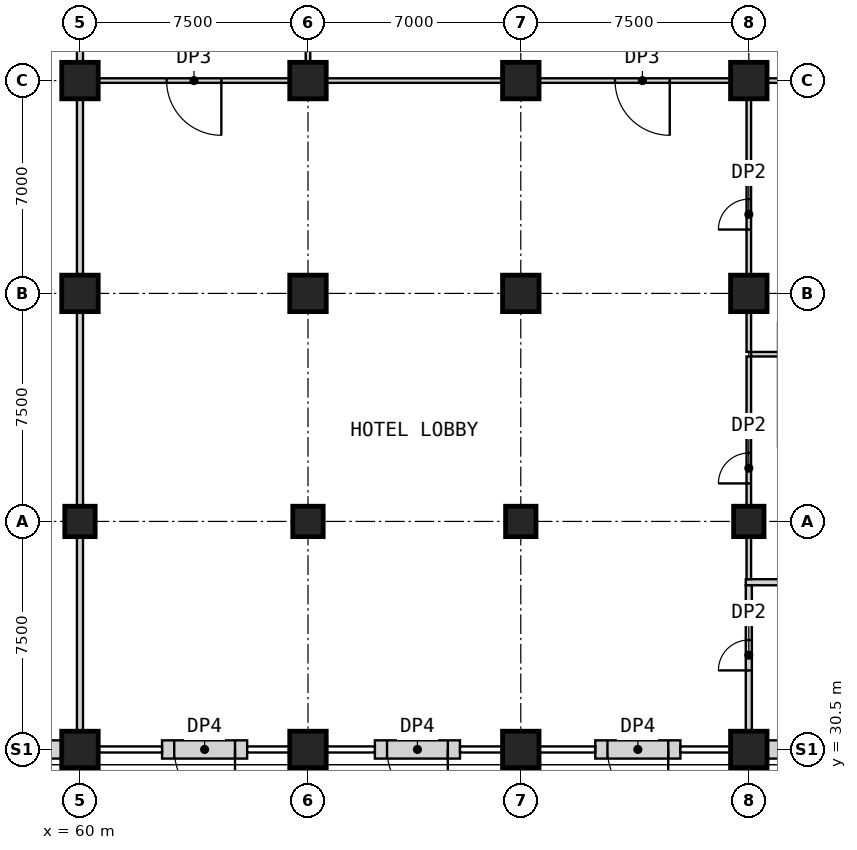
"""IFC4 building model, lengths in metres.
Left out: names, types, materials, properties, quantities, classifications, styles, units other than length and angle.
Written with IfcOpenShell. Run it as: python <this file> out.ifc"""

import sys

from ifc_helpers import new_model, si_unit, direction, frame, frame_2d, origin, origin_2d, place, context, subcontext, project, spatial, rectangle, extrude, element, fill, save


model = new_model("IFC4")
c1 = context("Model", 3, precision=1e-05, world=origin(), true_north=direction((0.0, 1.0)))
c2 = subcontext(c1, "Body", "Model", "MODEL_VIEW")
j1 = project(units=[si_unit("LENGTHUNIT", "METRE"), si_unit("PLANEANGLEUNIT", "RADIAN")], contexts=[c1])
p1 = place(None, origin())
s1 = spatial("IfcSite", under=j1, at=p1, CompositionType="ELEMENT")
p2 = place(p1, origin())
s2 = spatial("IfcBuilding", under=s1, at=p2, CompositionType="ELEMENT")
p3 = place(p2, origin())
s3 = spatial("IfcBuildingStorey", under=s2, at=p3, CompositionType="ELEMENT", Elevation=0.0)
p4 = place(p3, frame((60.0, 38.0, 0.0), z_axis=(0.0, 0.0, 1.0), x_axis=(1.0, 0.0, 0.0)))
e1 = element("IfcColumn", 1, at=p4, inside=s3, PredefinedType="COLUMN", context=c2, shape_type="SweptSolid", body=[
    extrude(rectangle(XDim=1.0, YDim=1.0, at=origin_2d()), origin(), (0.0, 0.0, 1.0), 8.0),
])
for number, where, z_axis, x_axis in (
    (2, (60.0, 45.5, 0.0), (0.0, 0.0, 1.0), (1.0, 0.0, 0.0)),
    (3, (60.0, 52.5, 0.0), (0.0, 0.0, 1.0), (1.0, 0.0, 0.0)),
):
    element("IfcColumn", number, at=place(p3, frame(where, z_axis=z_axis, x_axis=x_axis)), inside=s3, PredefinedType="COLUMN", context=c2, shape_type="SweptSolid", body=[
        extrude(rectangle(XDim=1.2, YDim=1.2, at=origin_2d()), origin(), (0.0, 0.0, 1.0), 8.0),
    ])
p5 = place(p3, frame((67.5, 38.0, 0.0), z_axis=(0.0, 0.0, 1.0), x_axis=(1.0, 0.0, 0.0)))
e4 = element("IfcColumn", 4, at=p5, inside=s3, PredefinedType="COLUMN", context=c2, shape_type="SweptSolid", body=[
    extrude(rectangle(XDim=1.0, YDim=1.0, at=origin_2d()), origin(), (0.0, 0.0, 1.0), 8.0),
])
for number, where, z_axis, x_axis in (
    (5, (67.5, 45.5, 0.0), (0.0, 0.0, 1.0), (1.0, 0.0, 0.0)),
    (6, (67.5, 52.5, 0.0), (0.0, 0.0, 1.0), (1.0, 0.0, 0.0)),
):
    element("IfcColumn", number, at=place(p3, frame(where, z_axis=z_axis, x_axis=x_axis)), inside=s3, PredefinedType="COLUMN", context=c2, shape_type="SweptSolid", body=[
        extrude(rectangle(XDim=1.2, YDim=1.2, at=origin_2d()), origin(), (0.0, 0.0, 1.0), 8.0),
    ])
p6 = place(p3, frame((74.5, 38.0, 0.0), z_axis=(0.0, 0.0, 1.0), x_axis=(1.0, 0.0, 0.0)))
e7 = element("IfcColumn", 7, at=p6, inside=s3, PredefinedType="COLUMN", context=c2, shape_type="SweptSolid", body=[
    extrude(rectangle(XDim=1.0, YDim=1.0, at=origin_2d()), origin(), (0.0, 0.0, 1.0), 8.0),
])
for number, where, z_axis, x_axis in (
    (8, (74.5, 45.5, 0.0), (0.0, 0.0, 1.0), (1.0, 0.0, 0.0)),
    (9, (74.5, 52.5, 0.0), (0.0, 0.0, 1.0), (1.0, 0.0, 0.0)),
):
    element("IfcColumn", number, at=place(p3, frame(where, z_axis=z_axis, x_axis=x_axis)), inside=s3, PredefinedType="COLUMN", context=c2, shape_type="SweptSolid", body=[
        extrude(rectangle(XDim=1.2, YDim=1.2, at=origin_2d()), origin(), (0.0, 0.0, 1.0), 8.0),
    ])
p7 = place(p3, frame((82.0, 38.0, 0.0), z_axis=(0.0, 0.0, 1.0), x_axis=(1.0, 0.0, 0.0)))
e10 = element("IfcColumn", 10, at=p7, inside=s3, PredefinedType="COLUMN", context=c2, shape_type="SweptSolid", body=[
    extrude(rectangle(XDim=1.0, YDim=1.0, at=origin_2d()), origin(), (0.0, 0.0, 1.0), 8.0),
])
for number, where, z_axis, x_axis in (
    (11, (82.0, 45.5, 0.0), (0.0, 0.0, 1.0), (1.0, 0.0, 0.0)),
    (12, (82.0, 52.5, 0.0), (0.0, 0.0, 1.0), (1.0, 0.0, 0.0)),
    (13, (60.0, 30.5, 0.0), (0.0, 0.0, 1.0), (1.0, 0.0, 0.0)),
    (14, (67.5, 30.5, 0.0), (0.0, 0.0, 1.0), (1.0, 0.0, 0.0)),
    (15, (74.5, 30.5, 0.0), (0.0, 0.0, 1.0), (1.0, 0.0, 0.0)),
    (16, (82.0, 30.5, 0.0), (0.0, 0.0, 1.0), (1.0, 0.0, 0.0)),
):
    element("IfcColumn", number, at=place(p3, frame(where, z_axis=z_axis, x_axis=x_axis)), inside=s3, PredefinedType="COLUMN", context=c2, shape_type="SweptSolid", body=[
        extrude(rectangle(XDim=1.2, YDim=1.2, at=origin_2d()), origin(), (0.0, 0.0, 1.0), 8.0),
    ])
p8 = place(p3, frame((57.75, 30.5, 0.0), z_axis=(0.0, 0.0, 1.0), x_axis=(1.0, 0.0, 0.0)))
e17 = element("IfcWall", 17, at=p8, inside=s3, PredefinedType="PARTITIONING", context=c2, shape_type="SweptSolid", body=[
    extrude(rectangle(XDim=1.65, YDim=0.6, at=frame_2d((0.825, 0.0))), origin(), (0.0, 0.0, 1.0), 7.1),
])
p9 = place(p3, frame((65.5, 30.5, 0.0), z_axis=(0.0, 0.0, 1.0), x_axis=(-1.0, 0.0, 0.0)))
e18 = element("IfcWall", 18, at=p9, inside=s3, PredefinedType="PARTITIONING", context=c2, shape_type="SweptSolid", body=[
    extrude(rectangle(XDim=2.8, YDim=0.6, at=frame_2d((1.4, 0.0))), origin(), (0.0, 0.0, 1.0), 7.1),
])
p10 = place(p9, frame((0.4, 0.0, 0.0)))
e19 = element("IfcOpeningElement", 19, at=p10, cuts=e18, PredefinedType="OPENING", context=c2, shape_type="SweptSolid", body=[
    extrude(rectangle(XDim=2.0, YDim=2.4, at=frame_2d((1.0, 1.2))), frame((0.0, 0.31, 0.0), z_axis=(0.0, -1.0, 0.0), x_axis=(1.0, 0.0, 0.0)), (0.0, 0.0, 1.0), 0.62),
])
p11 = place(p3, frame((72.5, 30.5, 0.0), z_axis=(0.0, 0.0, 1.0), x_axis=(-1.0, 0.0, 0.0)))
e20 = element("IfcWall", 20, at=p11, inside=s3, PredefinedType="PARTITIONING", context=c2, shape_type="SweptSolid", body=[
    extrude(rectangle(XDim=2.8, YDim=0.6, at=frame_2d((1.4, 0.0))), origin(), (0.0, 0.0, 1.0), 7.1),
])
p12 = place(p11, frame((0.4, 0.0, 0.0)))
e21 = element("IfcOpeningElement", 21, at=p12, cuts=e20, PredefinedType="OPENING", context=c2, shape_type="SweptSolid", body=[
    extrude(rectangle(XDim=2.0, YDim=2.4, at=frame_2d((1.0, 1.2))), frame((0.0, 0.31, 0.0), z_axis=(0.0, -1.0, 0.0), x_axis=(1.0, 0.0, 0.0)), (0.0, 0.0, 1.0), 0.62),
])
p13 = place(p3, frame((79.75, 30.5, 0.0), z_axis=(0.0, 0.0, 1.0), x_axis=(-1.0, 0.0, 0.0)))
e22 = element("IfcWall", 22, at=p13, inside=s3, PredefinedType="PARTITIONING", context=c2, shape_type="SweptSolid", body=[
    extrude(rectangle(XDim=2.8, YDim=0.6, at=frame_2d((1.4, 0.0))), origin(), (0.0, 0.0, 1.0), 7.1),
])
p14 = place(p13, frame((0.4, 0.0, 0.0)))
e23 = element("IfcOpeningElement", 23, at=p14, cuts=e22, PredefinedType="OPENING", context=c2, shape_type="SweptSolid", body=[
    extrude(rectangle(XDim=2.0, YDim=2.4, at=frame_2d((1.0, 1.2))), frame((0.0, 0.31, 0.0), z_axis=(0.0, -1.0, 0.0), x_axis=(1.0, 0.0, 0.0)), (0.0, 0.0, 1.0), 0.62),
])
p15 = place(p3, frame((82.6, 30.5, 0.0), z_axis=(0.0, 0.0, 1.0), x_axis=(1.0, 0.0, 0.0)))
e24 = element("IfcWall", 24, at=p15, inside=s3, PredefinedType="PARTITIONING", context=c2, shape_type="SweptSolid", body=[
    extrude(rectangle(XDim=2.35, YDim=0.6, at=frame_2d((1.175, 0.0))), origin(), (0.0, 0.0, 1.0), 7.1),
])
p16 = place(p3, frame((66.9, 52.5, 0.0), z_axis=(0.0, 0.0, 1.0), x_axis=(-1.0, 0.0, 0.0)))
e25 = element("IfcWall", 25, at=p16, inside=s3, PredefinedType="PARTITIONING", context=c2, shape_type="SweptSolid", body=[
    extrude(rectangle(XDim=6.3, YDim=0.15, at=frame_2d((3.15, 0.0))), origin(), (0.0, 0.0, 1.0), 7.7),
])
p17 = place(p16, frame((2.25, 0.0, 0.0)))
e26 = element("IfcOpeningElement", 26, at=p17, cuts=e25, PredefinedType="OPENING", context=c2, shape_type="SweptSolid", body=[
    extrude(rectangle(XDim=1.8, YDim=2.4, at=frame_2d((0.9, 1.2))), frame((0.0, 0.085, 0.0), z_axis=(0.0, -1.0, 0.0), x_axis=(1.0, 0.0, 0.0)), (0.0, 0.0, 1.0), 0.17),
])
p18 = place(p3, frame((68.1, 52.5, 0.0), z_axis=(0.0, 0.0, 1.0), x_axis=(1.0, 0.0, 0.0)))
e27 = element("IfcWall", 27, at=p18, inside=s3, PredefinedType="PARTITIONING", context=c2, shape_type="SweptSolid", body=[
    extrude(rectangle(XDim=5.8, YDim=0.15, at=frame_2d((2.9, 0.0))), origin(), (0.0, 0.0, 1.0), 7.7),
])
p19 = place(p3, frame((81.4, 52.5, 0.0), z_axis=(0.0, 0.0, 1.0), x_axis=(-1.0, 0.0, 0.0)))
e28 = element("IfcWall", 28, at=p19, inside=s3, PredefinedType="PARTITIONING", context=c2, shape_type="SweptSolid", body=[
    extrude(rectangle(XDim=6.3, YDim=0.15, at=frame_2d((3.15, 0.0))), origin(), (0.0, 0.0, 1.0), 7.7),
])
p20 = place(p19, frame((2.0, 0.0, 0.0)))
e29 = element("IfcOpeningElement", 29, at=p20, cuts=e28, PredefinedType="OPENING", context=c2, shape_type="SweptSolid", body=[
    extrude(rectangle(XDim=1.8, YDim=2.4, at=frame_2d((0.9, 1.2))), frame((0.0, 0.085, 0.0), z_axis=(0.0, -1.0, 0.0), x_axis=(1.0, 0.0, 0.0)), (0.0, 0.0, 1.0), 0.17),
])
p21 = place(p3, frame((82.6, 52.5, 0.0), z_axis=(0.0, 0.0, 1.0), x_axis=(1.0, 0.0, 0.0)))
e30 = element("IfcWall", 30, at=p21, inside=s3, PredefinedType="PARTITIONING", context=c2, shape_type="SweptSolid", body=[
    extrude(rectangle(XDim=6.4, YDim=0.15, at=frame_2d((3.2, 0.0))), origin(), (0.0, 0.0, 1.0), 7.7),
])
p22 = place(p3, frame((81.9, 36.0, 0.0), z_axis=(0.0, 0.0, 1.0), x_axis=(1.0, 0.0, 0.0)))
e31 = element("IfcWall", 31, at=p22, inside=s3, PredefinedType="PARTITIONING", context=c2, shape_type="SweptSolid", body=[
    extrude(rectangle(XDim=7.7, YDim=0.2, at=frame_2d((3.85, 0.0))), origin(), (0.0, 0.0, 1.0), 7.7),
])
p23 = place(p3, frame((82.075, 43.5, 0.0), z_axis=(0.0, 0.0, 1.0), x_axis=(1.0, 0.0, 0.0)))
e32 = element("IfcWall", 32, at=p23, inside=s3, PredefinedType="PARTITIONING", context=c2, shape_type="SweptSolid", body=[
    extrude(rectangle(XDim=0.925, YDim=0.15, at=frame_2d((0.462, 0.0))), origin(), (0.0, 0.0, 1.0), 7.7),
])
for number, where, z_axis, x_axis in (
    (33, (60.0, 31.1, 0.0), (0.0, 0.0, 1.0), (0.0, 1.0, 0.0)),
    (34, (60.0, 38.5, 0.0), (0.0, 0.0, 1.0), (0.0, 1.0, 0.0)),
):
    element("IfcWall", number, at=place(p3, frame(where, z_axis=z_axis, x_axis=x_axis)), inside=s3, PredefinedType="PARTITIONING", context=c2, shape_type="SweptSolid", body=[
        extrude(rectangle(XDim=6.4, YDim=0.2, at=frame_2d((3.2, 0.0))), origin(), (0.0, 0.0, 1.0), 7.7),
    ])
p24 = place(p3, frame((60.0, 46.1, 0.0), z_axis=(0.0, 0.0, 1.0), x_axis=(0.0, 1.0, 0.0)))
e35 = element("IfcWall", 35, at=p24, inside=s3, PredefinedType="PARTITIONING", context=c2, shape_type="SweptSolid", body=[
    extrude(rectangle(XDim=5.8, YDim=0.2, at=frame_2d((2.9, 0.0))), origin(), (0.0, 0.0, 1.0), 7.7),
])
p25 = place(p3, frame((60.0, 53.1, 0.0), z_axis=(0.0, 0.0, 1.0), x_axis=(0.0, 1.0, 0.0)))
e36 = element("IfcWall", 36, at=p25, inside=s3, PredefinedType="PARTITIONING", context=c2, shape_type="SweptSolid", body=[
    extrude(rectangle(XDim=6.8, YDim=0.2, at=frame_2d((3.4, 0.0))), origin(), (0.0, 0.0, 1.0), 7.7),
])
p26 = place(p3, frame((67.5, 53.1, 0.0), z_axis=(0.0, 0.0, 1.0), x_axis=(0.0, 1.0, 0.0)))
e37 = element("IfcWall", 37, at=p26, inside=s3, PredefinedType="PARTITIONING", context=c2, shape_type="SweptSolid", body=[
    extrude(rectangle(XDim=6.3, YDim=0.15, at=frame_2d((3.15, 0.0))), origin(), (0.0, 0.0, 1.0), 7.7),
])
p27 = place(p3, frame((82.0, 31.1, 0.0), z_axis=(0.0, 0.0, 1.0), x_axis=(0.0, 1.0, 0.0)))
e38 = element("IfcWall", 38, at=p27, inside=s3, PredefinedType="PARTITIONING", context=c2, shape_type="SweptSolid", body=[
    extrude(rectangle(XDim=4.8, YDim=0.2, at=frame_2d((2.4, 0.0))), origin(), (0.0, 0.0, 1.0), 7.7),
])
p28 = place(p27, frame((2.0, 0.0, 0.0)))
e39 = element("IfcOpeningElement", 39, at=p28, cuts=e38, PredefinedType="OPENING", context=c2, shape_type="SweptSolid", body=[
    extrude(rectangle(XDim=1.0, YDim=2.1, at=frame_2d((0.5, 1.05))), frame((0.0, 0.11, 0.0), z_axis=(0.0, -1.0, 0.0), x_axis=(1.0, 0.0, 0.0)), (0.0, 0.0, 1.0), 0.22),
])
p29 = place(p3, frame((82.0, 36.1, 0.0), z_axis=(0.0, 0.0, 1.0), x_axis=(0.0, 1.0, 0.0)))
e40 = element("IfcWall", 40, at=p29, inside=s3, PredefinedType="PARTITIONING", context=c2, shape_type="SweptSolid", body=[
    extrude(rectangle(XDim=1.4, YDim=0.15, at=frame_2d((0.7, 0.0))), origin(), (0.0, 0.0, 1.0), 7.7),
])
p30 = place(p3, frame((82.0, 38.5, 0.0), z_axis=(0.0, 0.0, 1.0), x_axis=(0.0, 1.0, 0.0)))
e41 = element("IfcWall", 41, at=p30, inside=s3, PredefinedType="PARTITIONING", context=c2, shape_type="SweptSolid", body=[
    extrude(rectangle(XDim=4.925, YDim=0.15, at=frame_2d((2.462, 0.0))), origin(), (0.0, 0.0, 1.0), 7.7),
])
p31 = place(p30, frame((0.75, 0.0, 0.0)))
e42 = element("IfcOpeningElement", 42, at=p31, cuts=e41, PredefinedType="OPENING", context=c2, shape_type="SweptSolid", body=[
    extrude(rectangle(XDim=1.0, YDim=2.1, at=frame_2d((0.5, 1.05))), frame((0.0, 0.085, 0.0), z_axis=(0.0, -1.0, 0.0), x_axis=(1.0, 0.0, 0.0)), (0.0, 0.0, 1.0), 0.17),
])
p32 = place(p3, frame((82.0, 43.575, 0.0), z_axis=(0.0, 0.0, 1.0), x_axis=(0.0, 1.0, 0.0)))
e43 = element("IfcWall", 43, at=p32, inside=s3, PredefinedType="PARTITIONING", context=c2, shape_type="SweptSolid", body=[
    extrude(rectangle(XDim=1.325, YDim=0.15, at=frame_2d((0.663, 0.0))), origin(), (0.0, 0.0, 1.0), 7.7),
])
p33 = place(p3, frame((82.0, 46.1, 0.0), z_axis=(0.0, 0.0, 1.0), x_axis=(0.0, 1.0, 0.0)))
e44 = element("IfcWall", 44, at=p33, inside=s3, PredefinedType="PARTITIONING", context=c2, shape_type="SweptSolid", body=[
    extrude(rectangle(XDim=5.8, YDim=0.15, at=frame_2d((2.9, 0.0))), origin(), (0.0, 0.0, 1.0), 7.7),
])
p34 = place(p33, frame((1.5, 0.0, 0.0)))
e45 = element("IfcOpeningElement", 45, at=p34, cuts=e44, PredefinedType="OPENING", context=c2, shape_type="SweptSolid", body=[
    extrude(rectangle(XDim=1.0, YDim=2.1, at=frame_2d((0.5, 1.05))), frame((0.0, 0.085, 0.0), z_axis=(0.0, -1.0, 0.0), x_axis=(1.0, 0.0, 0.0)), (0.0, 0.0, 1.0), 0.17),
])
p35 = place(p10, origin())
e46 = element("IfcDoor", 46, at=p35, inside=s3, OperationType="SINGLE_SWING_LEFT", PredefinedType="DOOR", context=c2, shape_type="SweptSolid", body=[
    extrude(rectangle(XDim=2.0, YDim=2.4, at=frame_2d((1.0, 1.2))), frame((0.0, 0.025, 0.0), z_axis=(0.0, -1.0, 0.0), x_axis=(1.0, 0.0, 0.0)), (0.0, 0.0, 1.0), 0.05),
])
fill(e19, e46)
p36 = place(p12, origin())
e47 = element("IfcDoor", 47, at=p36, inside=s3, OperationType="SINGLE_SWING_LEFT", PredefinedType="DOOR", context=c2, shape_type="SweptSolid", body=[
    extrude(rectangle(XDim=2.0, YDim=2.4, at=frame_2d((1.0, 1.2))), frame((0.0, 0.025, 0.0), z_axis=(0.0, -1.0, 0.0), x_axis=(1.0, 0.0, 0.0)), (0.0, 0.0, 1.0), 0.05),
])
fill(e21, e47)
p37 = place(p14, origin())
e48 = element("IfcDoor", 48, at=p37, inside=s3, OperationType="SINGLE_SWING_LEFT", PredefinedType="DOOR", context=c2, shape_type="SweptSolid", body=[
    extrude(rectangle(XDim=2.0, YDim=2.4, at=frame_2d((1.0, 1.2))), frame((0.0, 0.025, 0.0), z_axis=(0.0, -1.0, 0.0), x_axis=(1.0, 0.0, 0.0)), (0.0, 0.0, 1.0), 0.05),
])
fill(e23, e48)
p38 = place(p17, origin())
e49 = element("IfcDoor", 49, at=p38, inside=s3, OperationType="SINGLE_SWING_LEFT", PredefinedType="DOOR", context=c2, shape_type="SweptSolid", body=[
    extrude(rectangle(XDim=1.8, YDim=2.4, at=frame_2d((0.9, 1.2))), frame((0.0, 0.025, 0.0), z_axis=(0.0, -1.0, 0.0), x_axis=(1.0, 0.0, 0.0)), (0.0, 0.0, 1.0), 0.05),
])
fill(e26, e49)
p39 = place(p20, origin())
e50 = element("IfcDoor", 50, at=p39, inside=s3, OperationType="SINGLE_SWING_LEFT", PredefinedType="DOOR", context=c2, shape_type="SweptSolid", body=[
    extrude(rectangle(XDim=1.8, YDim=2.4, at=frame_2d((0.9, 1.2))), frame((0.0, 0.025, 0.0), z_axis=(0.0, -1.0, 0.0), x_axis=(1.0, 0.0, 0.0)), (0.0, 0.0, 1.0), 0.05),
])
fill(e29, e50)
p40 = place(p28, origin())
e51 = element("IfcDoor", 51, at=p40, inside=s3, OperationType="SINGLE_SWING_LEFT", PredefinedType="DOOR", context=c2, shape_type="SweptSolid", body=[
    extrude(rectangle(XDim=1.0, YDim=2.1, at=frame_2d((0.5, 1.05))), frame((0.0, 0.025, 0.0), z_axis=(0.0, -1.0, 0.0), x_axis=(1.0, 0.0, 0.0)), (0.0, 0.0, 1.0), 0.05),
])
fill(e39, e51)
p41 = place(p31, origin())
e52 = element("IfcDoor", 52, at=p41, inside=s3, OperationType="SINGLE_SWING_LEFT", PredefinedType="DOOR", context=c2, shape_type="SweptSolid", body=[
    extrude(rectangle(XDim=1.0, YDim=2.1, at=frame_2d((0.5, 1.05))), frame((0.0, 0.025, 0.0), z_axis=(0.0, -1.0, 0.0), x_axis=(1.0, 0.0, 0.0)), (0.0, 0.0, 1.0), 0.05),
])
fill(e42, e52)
p42 = place(p34, origin())
e53 = element("IfcDoor", 53, at=p42, inside=s3, OperationType="SINGLE_SWING_LEFT", PredefinedType="DOOR", context=c2, shape_type="SweptSolid", body=[
    extrude(rectangle(XDim=1.0, YDim=2.1, at=frame_2d((0.5, 1.05))), frame((0.0, 0.025, 0.0), z_axis=(0.0, -1.0, 0.0), x_axis=(1.0, 0.0, 0.0)), (0.0, 0.0, 1.0), 0.05),
])
fill(e45, e53)
save(model, sys.argv[1])
